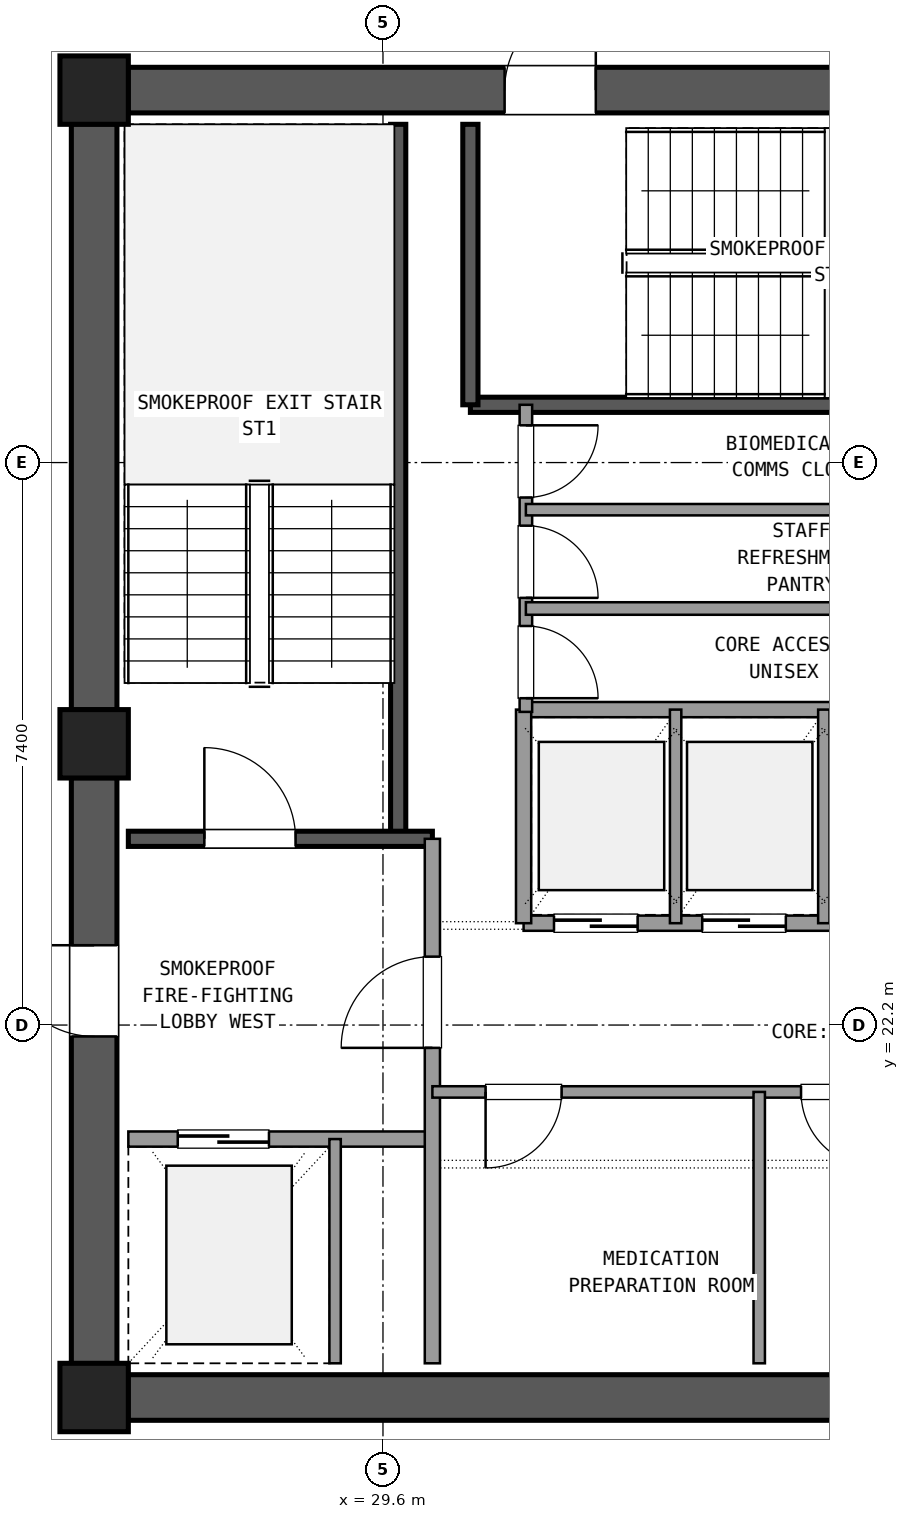
"""IFC4 building model, lengths in metres.
Left out: names, types, materials, properties, quantities, classifications, styles, units other than length and angle.
Written with IfcOpenShell. Run it as: python <this file> out.ifc"""

import sys

from ifc_helpers import new_model, si_unit, direction, frame, frame_2d, origin, origin_2d, place, context, subcontext, project, spatial, rectangle, extrude, element, fill, save


model = new_model("IFC4")
c1 = context("Model", 3, precision=1e-05, world=origin(), true_north=direction((0.0, 1.0)))
c2 = subcontext(c1, "Body", "Model", "MODEL_VIEW")
j1 = project(units=[si_unit("LENGTHUNIT", "METRE"), si_unit("PLANEANGLEUNIT", "RADIAN")], contexts=[c1])
p1 = place(None, origin())
s1 = spatial("IfcSite", under=j1, at=p1, CompositionType="ELEMENT")
p2 = place(p1, origin())
s2 = spatial("IfcBuilding", under=s1, at=p2, CompositionType="ELEMENT")
p3 = place(p2, frame((0.0, 0.0, 242.82)))
s3 = spatial("IfcBuildingStorey", under=s2, at=p3, CompositionType="ELEMENT", Elevation=242.82)
for number, where, z_axis, x_axis in (
    (1, (25.8, 17.3, 0.0), (0.0, 0.0, 1.0), (1.0, 0.0, 0.0)),
    (2, (25.8, 34.5, 0.0), (0.0, 0.0, 1.0), (1.0, 0.0, 0.0)),
    (3, (25.8, 25.9, 0.0), (0.0, 0.0, 1.0), (1.0, 0.0, 0.0)),
):
    element("IfcColumn", number, at=place(p3, frame(where, z_axis=z_axis, x_axis=x_axis)), inside=s3, PredefinedType="COLUMN", context=c2, shape_type="SweptSolid", body=[
        extrude(rectangle(XDim=0.9, YDim=0.9, at=origin_2d()), origin(), (0.0, 0.0, 1.0), 3.6),
    ])
p4 = place(p3, frame((26.245, 17.3, 0.0), z_axis=(0.0, 0.0, 1.0), x_axis=(1.0, 0.0, 0.0)))
e4 = element("IfcWall", 4, at=p4, inside=s3, PredefinedType="SHEAR", context=c2, shape_type="SweptSolid", body=[
    extrude(rectangle(XDim=10.31, YDim=0.6, at=frame_2d((5.155, 0.0))), origin(), (0.0, 0.0, 1.0), 3.32),
])
p5 = place(p3, frame((36.555, 34.5, 0.0), z_axis=(0.0, 0.0, 1.0), x_axis=(-1.0, 0.0, 0.0)))
e5 = element("IfcWall", 5, at=p5, inside=s3, PredefinedType="SHEAR", context=c2, shape_type="SweptSolid", body=[
    extrude(rectangle(XDim=10.31, YDim=0.6, at=frame_2d((5.155, 0.0))), origin(), (0.0, 0.0, 1.0), 3.32),
])
p6 = place(p5, frame((4.155, 0.0, 0.0)))
e6 = element("IfcOpeningElement", 6, at=p6, cuts=e5, PredefinedType="OPENING", context=c2, shape_type="SweptSolid", body=[
    extrude(rectangle(XDim=1.2, YDim=2.15, at=frame_2d((0.6, 1.075))), frame((0.0, 0.31, 0.0), z_axis=(0.0, -1.0, 0.0), x_axis=(1.0, 0.0, 0.0)), (0.0, 0.0, 1.0), 0.62),
])
p7 = place(p3, frame((25.8, 34.055, 0.0), z_axis=(0.0, 0.0, 1.0), x_axis=(0.0, -1.0, 0.0)))
e7 = element("IfcWall", 7, at=p7, inside=s3, PredefinedType="SHEAR", context=c2, shape_type="SweptSolid", body=[
    extrude(rectangle(XDim=7.71, YDim=0.6, at=frame_2d((3.855, 0.0))), origin(), (0.0, 0.0, 1.0), 3.32),
])
p8 = place(p3, frame((25.8, 25.455, 0.0), z_axis=(0.0, 0.0, 1.0), x_axis=(0.0, -1.0, 0.0)))
e8 = element("IfcWall", 8, at=p8, inside=s3, PredefinedType="SHEAR", context=c2, shape_type="SweptSolid", body=[
    extrude(rectangle(XDim=7.71, YDim=0.6, at=frame_2d((3.855, 0.0))), origin(), (0.0, 0.0, 1.0), 3.32),
])
p9 = place(p8, frame((2.205, 0.0, 0.0)))
e9 = element("IfcOpeningElement", 9, at=p9, cuts=e8, PredefinedType="OPENING", context=c2, shape_type="SweptSolid", body=[
    extrude(rectangle(XDim=1.2, YDim=2.15, at=frame_2d((0.6, 1.075))), frame((0.0, 0.31, 0.0), z_axis=(0.0, -1.0, 0.0), x_axis=(1.0, 0.0, 0.0)), (0.0, 0.0, 1.0), 0.62),
])
p10 = place(p3, frame((29.8, 24.65, 0.0), z_axis=(0.0, 0.0, 1.0), x_axis=(0.0, 1.0, 0.0)))
e10 = element("IfcWall", 10, at=p10, inside=s3, PredefinedType="SHEAR", context=c2, shape_type="SweptSolid", body=[
    extrude(rectangle(XDim=9.4, YDim=0.2, at=frame_2d((4.7, 0.0))), origin(), (0.0, 0.0, 1.0), 3.32),
])
p11 = place(p3, frame((26.25, 24.65, 0.0), z_axis=(0.0, 0.0, 1.0), x_axis=(1.0, 0.0, 0.0)))
e11 = element("IfcWall", 11, at=p11, inside=s3, PredefinedType="SHEAR", context=c2, shape_type="SweptSolid", body=[
    extrude(rectangle(XDim=4.0, YDim=0.2, at=frame_2d((2.0, 0.0))), origin(), (0.0, 0.0, 1.0), 3.32),
])
p12 = place(p11, frame((1.0, 0.0, 0.0)))
e12 = element("IfcOpeningElement", 12, at=p12, cuts=e11, PredefinedType="OPENING", context=c2, shape_type="SweptSolid", body=[
    extrude(rectangle(XDim=1.2, YDim=2.15, at=frame_2d((0.6, 1.075))), frame((0.0, 0.11, 0.0), z_axis=(0.0, -1.0, 0.0), x_axis=(1.0, 0.0, 0.0)), (0.0, 0.0, 1.0), 0.22),
])
p13 = place(p3, frame((30.75, 30.36, 0.0), z_axis=(0.0, 0.0, 1.0), x_axis=(1.0, 0.0, 0.0)))
e13 = element("IfcWall", 13, at=p13, inside=s3, PredefinedType="SHEAR", context=c2, shape_type="SweptSolid", body=[
    extrude(rectangle(XDim=9.5, YDim=0.2, at=frame_2d((4.75, 0.0))), origin(), (0.0, 0.0, 1.0), 3.32),
])
p14 = place(p3, frame((30.75, 30.36, 0.0), z_axis=(0.0, 0.0, 1.0), x_axis=(0.0, 1.0, 0.0)))
e14 = element("IfcWall", 14, at=p14, inside=s3, PredefinedType="SHEAR", context=c2, shape_type="SweptSolid", body=[
    extrude(rectangle(XDim=3.69, YDim=0.2, at=frame_2d((1.845, 0.0))), origin(), (0.0, 0.0, 1.0), 3.32),
])
p15 = place(p3, frame((26.25, 20.7, 0.0), z_axis=(0.0, 0.0, 1.0), x_axis=(1.0, 0.0, 0.0)))
e15 = element("IfcWall", 15, at=p15, inside=s3, PredefinedType="SOLIDWALL", context=c2, shape_type="SweptSolid", body=[
    extrude(rectangle(XDim=4.0, YDim=0.2, at=frame_2d((2.0, 0.0))), origin(), (0.0, 0.0, 1.0), 2.61),
])
p16 = place(p15, frame((0.65, 0.0, 0.0)))
e16 = element("IfcOpeningElement", 16, at=p16, cuts=e15, PredefinedType="OPENING", context=c2, shape_type="SweptSolid", body=[
    extrude(rectangle(XDim=1.2, YDim=2.15, at=frame_2d((0.6, 1.075))), frame((0.0, 0.11, 0.0), z_axis=(0.0, -1.0, 0.0), x_axis=(1.0, 0.0, 0.0)), (0.0, 0.0, 1.0), 0.22),
])
p17 = place(p3, frame((30.25, 17.75, 0.0), z_axis=(0.0, 0.0, 1.0), x_axis=(0.0, 1.0, 0.0)))
e17 = element("IfcWall", 17, at=p17, inside=s3, PredefinedType="SOLIDWALL", context=c2, shape_type="SweptSolid", body=[
    extrude(rectangle(XDim=6.9, YDim=0.2, at=frame_2d((3.45, 0.0))), origin(), (0.0, 0.0, 1.0), 2.61),
])
p18 = place(p17, frame((4.15, 0.0, 0.0)))
e18 = element("IfcOpeningElement", 18, at=p18, cuts=e17, PredefinedType="OPENING", context=c2, shape_type="SweptSolid", body=[
    extrude(rectangle(XDim=1.2, YDim=2.15, at=frame_2d((0.6, 1.075))), frame((0.0, 0.11, 0.0), z_axis=(0.0, -1.0, 0.0), x_axis=(1.0, 0.0, 0.0)), (0.0, 0.0, 1.0), 0.22),
])
p19 = place(p3, frame((28.97, 17.75, 0.0), z_axis=(0.0, 0.0, 1.0), x_axis=(0.0, 1.0, 0.0)))
e19 = element("IfcWall", 19, at=p19, inside=s3, PredefinedType="PARTITIONING", context=c2, shape_type="SweptSolid", body=[
    extrude(rectangle(XDim=2.95, YDim=0.15, at=frame_2d((1.475, 0.0))), origin(), (0.0, 0.0, 1.0), 2.61),
])
p20 = place(p3, frame((30.25, 21.32, 0.0), z_axis=(0.0, 0.0, 1.0), x_axis=(1.0, 0.0, 0.0)))
e20 = element("IfcWall", 20, at=p20, inside=s3, PredefinedType="PARTITIONING", context=c2, shape_type="SweptSolid", body=[
    extrude(rectangle(XDim=7.0, YDim=0.15, at=frame_2d((3.5, 0.0))), origin(), (0.0, 0.0, 1.0), 2.61),
])
p21 = place(p20, frame((0.7, 0.0, 0.0)))
e21 = element("IfcOpeningElement", 21, at=p21, cuts=e20, PredefinedType="OPENING", context=c2, shape_type="SweptSolid", body=[
    extrude(rectangle(XDim=1.0, YDim=2.15, at=frame_2d((0.5, 1.075))), frame((0.0, 0.085, 0.0), z_axis=(0.0, -1.0, 0.0), x_axis=(1.0, 0.0, 0.0)), (0.0, 0.0, 1.0), 0.17),
])
p22 = place(p20, frame((4.85, 0.0, 0.0)))
e22 = element("IfcOpeningElement", 22, at=p22, cuts=e20, PredefinedType="OPENING", context=c2, shape_type="SweptSolid", body=[
    extrude(rectangle(XDim=1.0, YDim=2.15, at=frame_2d((0.5, 1.075))), frame((0.0, 0.085, 0.0), z_axis=(0.0, -1.0, 0.0), x_axis=(1.0, 0.0, 0.0)), (0.0, 0.0, 1.0), 0.17),
])
p23 = place(p3, frame((34.55, 17.75, 0.0), z_axis=(0.0, 0.0, 1.0), x_axis=(0.0, 1.0, 0.0)))
e23 = element("IfcWall", 23, at=p23, inside=s3, PredefinedType="PARTITIONING", context=c2, shape_type="SweptSolid", body=[
    extrude(rectangle(XDim=3.57, YDim=0.15, at=frame_2d((1.785, 0.0))), origin(), (0.0, 0.0, 1.0), 2.61),
])
p24 = place(p3, frame((31.45, 23.54, 0.0), z_axis=(0.0, 0.0, 1.0), x_axis=(1.0, 0.0, 0.0)))
e24 = element("IfcWall", 24, at=p24, inside=s3, PredefinedType="SOLIDWALL", context=c2, shape_type="SweptSolid", body=[
    extrude(rectangle(XDim=5.9, YDim=0.2, at=frame_2d((2.95, 0.0))), origin(), (0.0, 0.0, 1.0), 2.61),
])
p25 = place(p24, frame((0.4, 0.0, 0.0)))
e25 = element("IfcOpeningElement", 25, at=p25, cuts=e24, PredefinedType="OPENING", context=c2, shape_type="SweptSolid", body=[
    extrude(rectangle(XDim=1.1, YDim=2.15, at=frame_2d((0.55, 1.075))), frame((0.0, 0.11, 0.0), z_axis=(0.0, -1.0, 0.0), x_axis=(1.0, 0.0, 0.0)), (0.0, 0.0, 1.0), 0.22),
])
p26 = place(p24, frame((2.35, 0.0, 0.0)))
e26 = element("IfcOpeningElement", 26, at=p26, cuts=e24, PredefinedType="OPENING", context=c2, shape_type="SweptSolid", body=[
    extrude(rectangle(XDim=1.1, YDim=2.15, at=frame_2d((0.55, 1.075))), frame((0.0, 0.11, 0.0), z_axis=(0.0, -1.0, 0.0), x_axis=(1.0, 0.0, 0.0)), (0.0, 0.0, 1.0), 0.22),
])
p27 = place(p24, frame((4.3, 0.0, 0.0)))
e27 = element("IfcOpeningElement", 27, at=p27, cuts=e24, PredefinedType="OPENING", context=c2, shape_type="SweptSolid", body=[
    extrude(rectangle(XDim=1.1, YDim=2.15, at=frame_2d((0.55, 1.075))), frame((0.0, 0.11, 0.0), z_axis=(0.0, -1.0, 0.0), x_axis=(1.0, 0.0, 0.0)), (0.0, 0.0, 1.0), 0.22),
])
p28 = place(p3, frame((31.45, 26.35, 0.0), z_axis=(0.0, 0.0, 1.0), x_axis=(1.0, 0.0, 0.0)))
e28 = element("IfcWall", 28, at=p28, inside=s3, PredefinedType="SOLIDWALL", context=c2, shape_type="SweptSolid", body=[
    extrude(rectangle(XDim=5.9, YDim=0.2, at=frame_2d((2.95, 0.0))), origin(), (0.0, 0.0, 1.0), 2.61),
])
p29 = place(p3, frame((31.45, 23.54, 0.0), z_axis=(0.0, 0.0, 1.0), x_axis=(0.0, 1.0, 0.0)))
e29 = element("IfcWall", 29, at=p29, inside=s3, PredefinedType="SOLIDWALL", context=c2, shape_type="SweptSolid", body=[
    extrude(rectangle(XDim=2.81, YDim=0.2, at=frame_2d((1.405, 0.0))), origin(), (0.0, 0.0, 1.0), 2.61),
])
for number, where, z_axis, x_axis in (
    (30, (33.45, 23.54, 0.0), (0.0, 0.0, 1.0), (0.0, 1.0, 0.0)),
    (31, (35.4, 23.54, 0.0), (0.0, 0.0, 1.0), (0.0, 1.0, 0.0)),
):
    element("IfcWall", number, at=place(p3, frame(where, z_axis=z_axis, x_axis=x_axis)), inside=s3, PredefinedType="PARTITIONING", context=c2, shape_type="SweptSolid", body=[
        extrude(rectangle(XDim=2.81, YDim=0.15, at=frame_2d((1.405, 0.0))), origin(), (0.0, 0.0, 1.0), 2.61),
    ])
p30 = place(p3, frame((31.48, 26.32, 0.0), z_axis=(0.0, 0.0, 1.0), x_axis=(0.0, 1.0, 0.0)))
e32 = element("IfcWall", 32, at=p30, inside=s3, PredefinedType="PLUMBINGWALL", context=c2, shape_type="SweptSolid", body=[
    extrude(rectangle(XDim=4.04, YDim=0.165, at=frame_2d((2.02, 0.0))), origin(), (0.0, 0.0, 1.0), 2.61),
])
p31 = place(p30, frame((0.18, 0.0, 0.0)))
e33 = element("IfcOpeningElement", 33, at=p31, cuts=e32, PredefinedType="OPENING", context=c2, shape_type="SweptSolid", body=[
    extrude(rectangle(XDim=0.95, YDim=2.1, at=frame_2d((0.475, 1.05))), frame((0.0, 0.093, 0.0), z_axis=(0.0, -1.0, 0.0), x_axis=(1.0, 0.0, 0.0)), (0.0, 0.0, 1.0), 0.185),
])
p32 = place(p30, frame((1.5, 0.0, 0.0)))
e34 = element("IfcOpeningElement", 34, at=p32, cuts=e32, PredefinedType="OPENING", context=c2, shape_type="SweptSolid", body=[
    extrude(rectangle(XDim=0.95, YDim=2.1, at=frame_2d((0.475, 1.05))), frame((0.0, 0.093, 0.0), z_axis=(0.0, -1.0, 0.0), x_axis=(1.0, 0.0, 0.0)), (0.0, 0.0, 1.0), 0.185),
])
p33 = place(p30, frame((2.82, 0.0, 0.0)))
e35 = element("IfcOpeningElement", 35, at=p33, cuts=e32, PredefinedType="OPENING", context=c2, shape_type="SweptSolid", body=[
    extrude(rectangle(XDim=0.95, YDim=2.1, at=frame_2d((0.475, 1.05))), frame((0.0, 0.093, 0.0), z_axis=(0.0, -1.0, 0.0), x_axis=(1.0, 0.0, 0.0)), (0.0, 0.0, 1.0), 0.185),
])
p34 = place(p3, frame((31.48, 27.68, 0.0), z_axis=(0.0, 0.0, 1.0), x_axis=(1.0, 0.0, 0.0)))
e36 = element("IfcWall", 36, at=p34, inside=s3, PredefinedType="PLUMBINGWALL", context=c2, shape_type="SweptSolid", body=[
    extrude(rectangle(XDim=5.87, YDim=0.165, at=frame_2d((2.935, 0.0))), origin(), (0.0, 0.0, 1.0), 2.61),
])
p35 = place(p3, frame((31.48, 28.98, 0.0), z_axis=(0.0, 0.0, 1.0), x_axis=(1.0, 0.0, 0.0)))
e37 = element("IfcWall", 37, at=p35, inside=s3, PredefinedType="PARTITIONING", context=c2, shape_type="SweptSolid", body=[
    extrude(rectangle(XDim=5.89, YDim=0.15, at=frame_2d((2.945, 0.0))), origin(), (0.0, 0.0, 1.0), 2.61),
])
p36 = place(p12, origin())
e38 = element("IfcDoor", 38, at=p36, inside=s3, OperationType="SINGLE_SWING_LEFT", PredefinedType="DOOR", context=c2, shape_type="SweptSolid", body=[
    extrude(rectangle(XDim=1.2, YDim=2.15, at=frame_2d((0.6, 1.075))), frame((0.0, 0.025, 0.0), z_axis=(0.0, -1.0, 0.0), x_axis=(1.0, 0.0, 0.0)), (0.0, 0.0, 1.0), 0.05),
])
fill(e12, e38)
p37 = place(p16, origin())
e39 = element("IfcDoor", 39, at=p37, inside=s3, OperationType="SLIDING_TO_LEFT", PredefinedType="DOOR", context=c2, shape_type="SweptSolid", body=[
    extrude(rectangle(XDim=1.2, YDim=2.15, at=frame_2d((0.6, 1.075))), frame((0.0, 0.025, 0.0), z_axis=(0.0, -1.0, 0.0), x_axis=(1.0, 0.0, 0.0)), (0.0, 0.0, 1.0), 0.05),
])
fill(e16, e39)
p38 = place(p18, origin())
e40 = element("IfcDoor", 40, at=p38, inside=s3, OperationType="SINGLE_SWING_LEFT", PredefinedType="DOOR", context=c2, shape_type="SweptSolid", body=[
    extrude(rectangle(XDim=1.2, YDim=2.15, at=frame_2d((0.6, 1.075))), frame((0.0, 0.025, 0.0), z_axis=(0.0, -1.0, 0.0), x_axis=(1.0, 0.0, 0.0)), (0.0, 0.0, 1.0), 0.05),
])
fill(e18, e40)
p39 = place(p9, frame((1.2, 0.0, 0.0), z_axis=(0.0, 0.0, 1.0), x_axis=(-1.0, 0.0, 0.0)))
e41 = element("IfcDoor", 41, at=p39, inside=s3, OperationType="SINGLE_SWING_LEFT", PredefinedType="DOOR", context=c2, shape_type="SweptSolid", body=[
    extrude(rectangle(XDim=1.2, YDim=2.15, at=frame_2d((0.6, 1.075))), frame((0.0, 0.025, 0.0), z_axis=(0.0, -1.0, 0.0), x_axis=(1.0, 0.0, 0.0)), (0.0, 0.0, 1.0), 0.05),
])
fill(e9, e41)
p40 = place(p6, frame((1.2, 0.0, 0.0), z_axis=(0.0, 0.0, 1.0), x_axis=(-1.0, 0.0, 0.0)))
e42 = element("IfcDoor", 42, at=p40, inside=s3, OperationType="SINGLE_SWING_LEFT", PredefinedType="DOOR", context=c2, shape_type="SweptSolid", body=[
    extrude(rectangle(XDim=1.2, YDim=2.15, at=frame_2d((0.6, 1.075))), frame((0.0, 0.025, 0.0), z_axis=(0.0, -1.0, 0.0), x_axis=(1.0, 0.0, 0.0)), (0.0, 0.0, 1.0), 0.05),
])
fill(e6, e42)
p41 = place(p21, frame((1.0, 0.0, 0.0), z_axis=(0.0, 0.0, 1.0), x_axis=(-1.0, 0.0, 0.0)))
e43 = element("IfcDoor", 43, at=p41, inside=s3, OperationType="SINGLE_SWING_LEFT", PredefinedType="DOOR", context=c2, shape_type="SweptSolid", body=[
    extrude(rectangle(XDim=1.0, YDim=2.15, at=frame_2d((0.5, 1.075))), frame((0.0, 0.025, 0.0), z_axis=(0.0, -1.0, 0.0), x_axis=(1.0, 0.0, 0.0)), (0.0, 0.0, 1.0), 0.05),
])
fill(e21, e43)
p42 = place(p22, frame((1.0, 0.0, 0.0), z_axis=(0.0, 0.0, 1.0), x_axis=(-1.0, 0.0, 0.0)))
e44 = element("IfcDoor", 44, at=p42, inside=s3, OperationType="SINGLE_SWING_RIGHT", PredefinedType="DOOR", context=c2, shape_type="SweptSolid", body=[
    extrude(rectangle(XDim=1.0, YDim=2.15, at=frame_2d((0.5, 1.075))), frame((0.0, 0.025, 0.0), z_axis=(0.0, -1.0, 0.0), x_axis=(1.0, 0.0, 0.0)), (0.0, 0.0, 1.0), 0.05),
])
fill(e22, e44)
p43 = place(p25, origin())
e45 = element("IfcDoor", 45, at=p43, inside=s3, OperationType="SLIDING_TO_RIGHT", PredefinedType="DOOR", context=c2, shape_type="SweptSolid", body=[
    extrude(rectangle(XDim=1.1, YDim=2.15, at=frame_2d((0.55, 1.075))), frame((0.0, 0.025, 0.0), z_axis=(0.0, -1.0, 0.0), x_axis=(1.0, 0.0, 0.0)), (0.0, 0.0, 1.0), 0.05),
])
fill(e25, e45)
p44 = place(p26, origin())
e46 = element("IfcDoor", 46, at=p44, inside=s3, OperationType="SLIDING_TO_RIGHT", PredefinedType="DOOR", context=c2, shape_type="SweptSolid", body=[
    extrude(rectangle(XDim=1.1, YDim=2.15, at=frame_2d((0.55, 1.075))), frame((0.0, 0.025, 0.0), z_axis=(0.0, -1.0, 0.0), x_axis=(1.0, 0.0, 0.0)), (0.0, 0.0, 1.0), 0.05),
])
fill(e26, e46)
p45 = place(p31, frame((0.95, 0.0, 0.0), z_axis=(0.0, 0.0, 1.0), x_axis=(-1.0, 0.0, 0.0)))
e47 = element("IfcDoor", 47, at=p45, inside=s3, OperationType="SINGLE_SWING_LEFT", PredefinedType="DOOR", context=c2, shape_type="SweptSolid", body=[
    extrude(rectangle(XDim=0.95, YDim=2.1, at=frame_2d((0.475, 1.05))), frame((0.0, 0.025, 0.0), z_axis=(0.0, -1.0, 0.0), x_axis=(1.0, 0.0, 0.0)), (0.0, 0.0, 1.0), 0.05),
])
fill(e33, e47)
p46 = place(p32, frame((0.95, 0.0, 0.0), z_axis=(0.0, 0.0, 1.0), x_axis=(-1.0, 0.0, 0.0)))
e48 = element("IfcDoor", 48, at=p46, inside=s3, OperationType="SINGLE_SWING_LEFT", PredefinedType="DOOR", context=c2, shape_type="SweptSolid", body=[
    extrude(rectangle(XDim=0.95, YDim=2.1, at=frame_2d((0.475, 1.05))), frame((0.0, 0.025, 0.0), z_axis=(0.0, -1.0, 0.0), x_axis=(1.0, 0.0, 0.0)), (0.0, 0.0, 1.0), 0.05),
])
fill(e34, e48)
p47 = place(p33, frame((0.95, 0.0, 0.0), z_axis=(0.0, 0.0, 1.0), x_axis=(-1.0, 0.0, 0.0)))
e49 = element("IfcDoor", 49, at=p47, inside=s3, OperationType="SINGLE_SWING_RIGHT", PredefinedType="DOOR", context=c2, shape_type="SweptSolid", body=[
    extrude(rectangle(XDim=0.95, YDim=2.1, at=frame_2d((0.475, 1.05))), frame((0.0, 0.025, 0.0), z_axis=(0.0, -1.0, 0.0), x_axis=(1.0, 0.0, 0.0)), (0.0, 0.0, 1.0), 0.05),
])
fill(e35, e49)
save(model, sys.argv[1])
